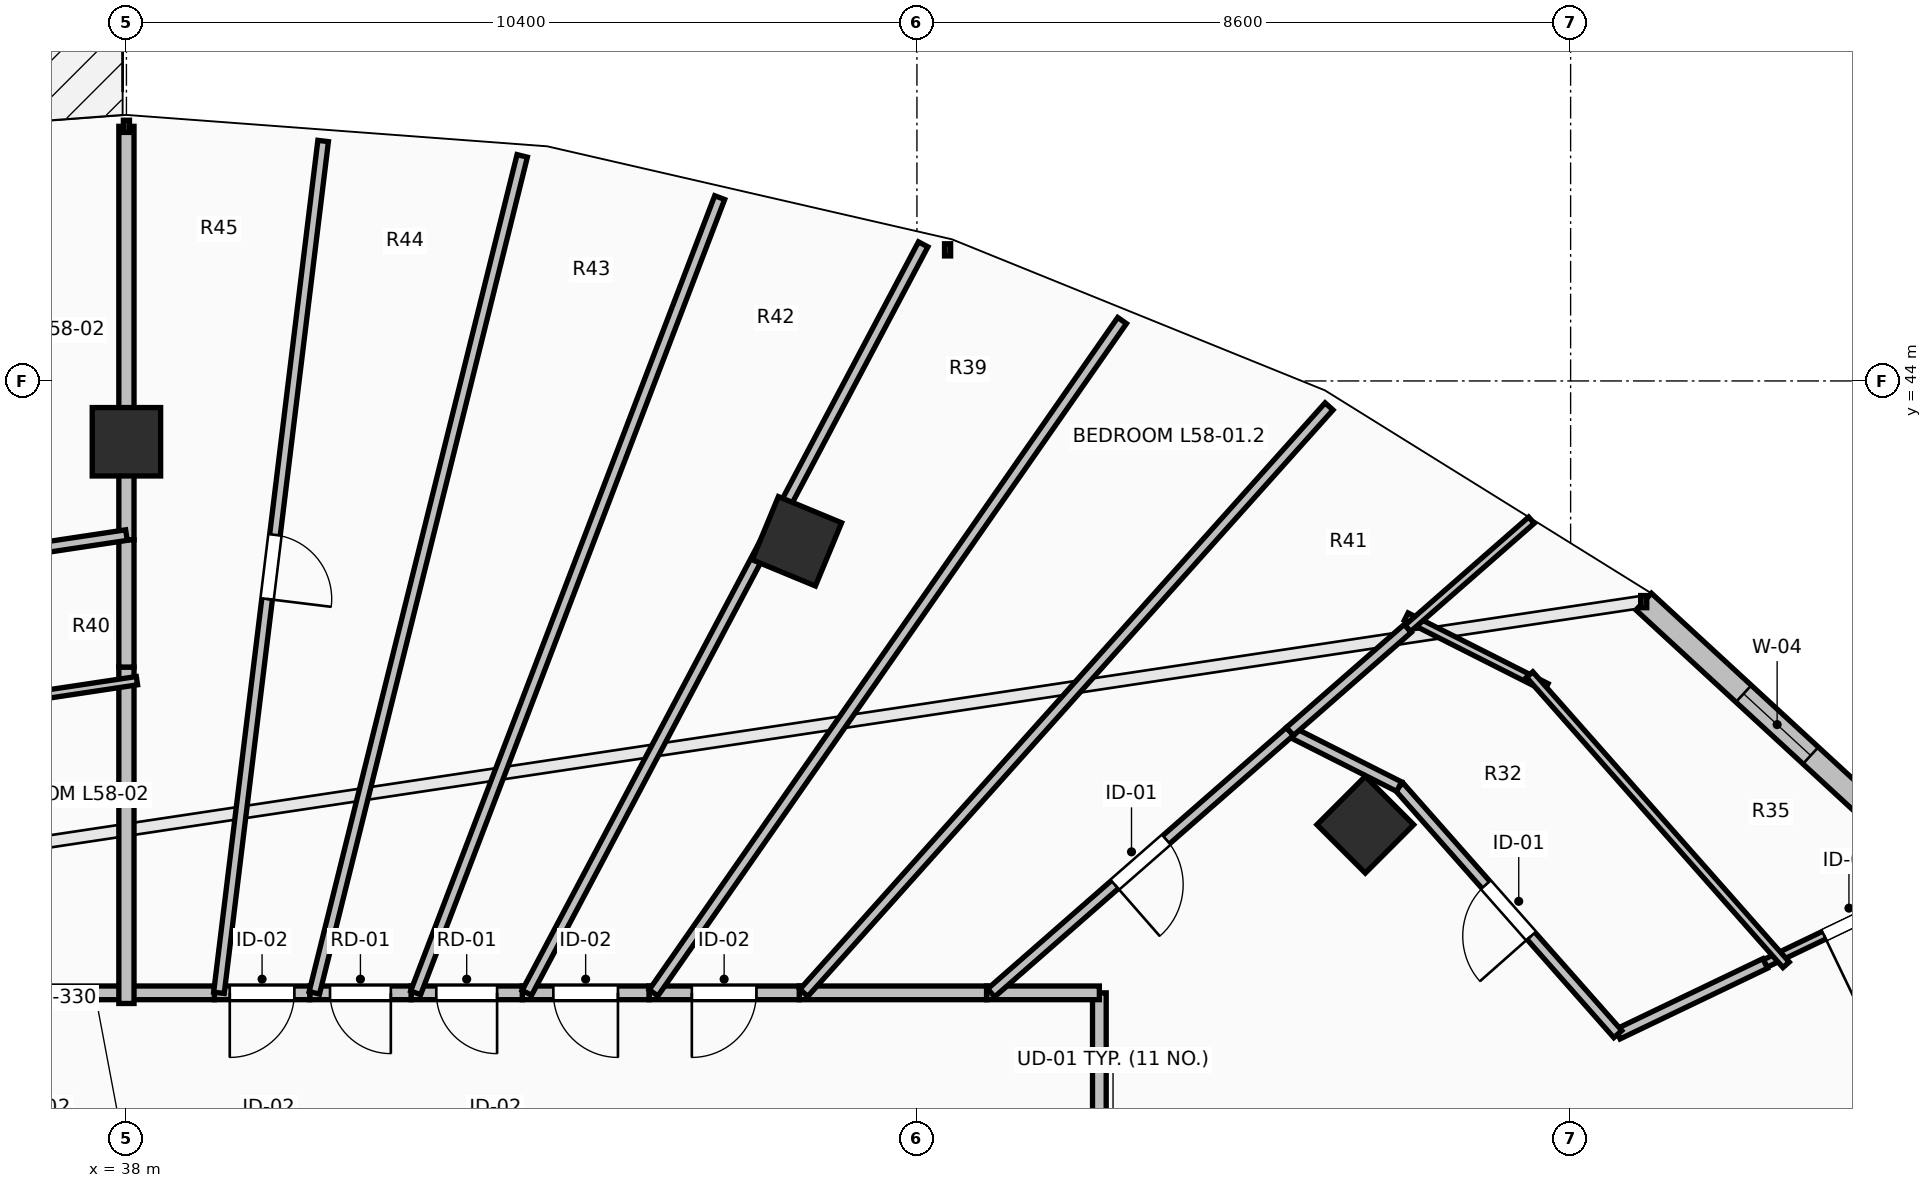
"""IFC4 building model, lengths in metres.
Left out: names, types, materials, properties, quantities, classifications, styles, units other than length and angle.
Written with IfcOpenShell. Run it as: python <this file> out.ifc"""

import sys

from ifc_helpers import new_model, si_unit, direction, frame, frame_2d, origin, origin_2d, place, context, subcontext, project, spatial, rectangle, extrude, element, fill, save


model = new_model("IFC4")
c1 = context("Model", 3, precision=1e-05, world=origin(), true_north=direction((0.0, 1.0)))
c2 = subcontext(c1, "Body", "Model", "MODEL_VIEW")
j1 = project(units=[si_unit("LENGTHUNIT", "METRE"), si_unit("PLANEANGLEUNIT", "RADIAN")], contexts=[c1])
p1 = place(None, origin())
s1 = spatial("IfcSite", under=j1, at=p1, CompositionType="ELEMENT")
p2 = place(p1, origin())
s2 = spatial("IfcBuilding", under=s1, at=p2, CompositionType="ELEMENT")
p3 = place(p2, frame((0.0, 0.0, 214.3)))
s3 = spatial("IfcBuildingStorey", under=s2, at=p3, CompositionType="ELEMENT", Elevation=214.3)
for number, where, z_axis, x_axis in (
    (1, (54.299, 38.162, 0.0), (0.0, 0.0, 1.0), (0.707, 0.707, 0.0)),
    (2, (46.821, 41.891, 0.0), (0.0, 0.0, 1.0), (0.383, 0.924, 0.0)),
    (3, (38.0, 43.2, 0.0), (0.0, 0.0, 1.0), (0.0, 1.0, 0.0)),
):
    element("IfcColumn", number, at=place(p3, frame(where, z_axis=z_axis, x_axis=x_axis)), inside=s3, PredefinedType="COLUMN", context=c2, shape_type="SweptSolid", body=[
        extrude(rectangle(XDim=0.9, YDim=0.9, at=origin_2d()), origin(), (0.0, 0.0, 1.0), 3.55),
    ])
p4 = place(p3, frame((61.472, 37.861, 0.0), z_axis=(0.0, 0.0, 1.0), x_axis=(-0.735359993374, 0.677676678177, 0.0)))
e4 = element("IfcWall", 4, at=p4, inside=s3, PredefinedType="STANDARD", context=c2, shape_type="SweptSolid", body=[
    extrude(rectangle(XDim=4.774, YDim=0.3, at=frame_2d((2.387, 0.0))), origin(), (0.0, 0.0, 1.0), 3.29),
])
p5 = place(p4, frame((1.787, 0.0, 0.85)))
e5 = element("IfcOpeningElement", 5, at=p5, cuts=e4, PredefinedType="OPENING", context=c2, shape_type="SweptSolid", body=[
    extrude(rectangle(XDim=1.2, YDim=2.1, at=frame_2d((0.6, 1.05))), frame((0.0, 0.165, 0.0), z_axis=(0.0, -1.0, 0.0), x_axis=(1.0, 0.0, 0.0)), (0.0, 0.0, 1.0), 0.33),
])
p6 = place(p3, frame((50.8, 31.751, 0.0), z_axis=(0.0, 0.0, 1.0), x_axis=(0.0, 1.0, 0.0)))
e6 = element("IfcWall", 6, at=p6, inside=s3, PredefinedType="PARTITIONING", context=c2, shape_type="SweptSolid", body=[
    extrude(rectangle(XDim=4.199, YDim=0.18, at=frame_2d((2.1, 0.0))), origin(), (0.0, 0.0, 1.0), 2.482),
])
p7 = place(p6, frame((1.6, 0.0, 0.0)))
e7 = element("IfcOpeningElement", 7, at=p7, cuts=e6, PredefinedType="OPENING", context=c2, shape_type="SweptSolid", body=[
    extrude(rectangle(XDim=1.0, YDim=2.15, at=frame_2d((0.5, 1.075))), frame((0.0, 0.105, 0.0), z_axis=(0.0, -1.0, 0.0), x_axis=(1.0, 0.0, 0.0)), (0.0, 0.0, 1.0), 0.21),
])
p8 = place(p3, frame((50.8, 35.95, 0.0), z_axis=(0.0, 0.0, 1.0), x_axis=(-1.0, 0.0, 0.0)))
e8 = element("IfcWall", 8, at=p8, inside=s3, PredefinedType="PARTITIONING", context=c2, shape_type="SweptSolid", body=[
    extrude(rectangle(XDim=1.484, YDim=0.18, at=frame_2d((0.742, 0.0))), origin(), (0.0, 0.0, 1.0), 3.29),
])
p9 = place(p3, frame((49.316, 35.95, 0.0), z_axis=(0.0, 0.0, 1.0), x_axis=(-1.0, 0.0, 0.0)))
e9 = element("IfcWall", 9, at=p9, inside=s3, PredefinedType="PARTITIONING", context=c2, shape_type="SweptSolid", body=[
    extrude(rectangle(XDim=2.464, YDim=0.18, at=frame_2d((1.232, 0.0))), origin(), (0.0, 0.0, 1.0), 2.482),
])
p10 = place(p3, frame((46.852, 35.95, 0.0), z_axis=(0.0, 0.0, 1.0), x_axis=(-1.0, 0.0, 0.0)))
e10 = element("IfcWall", 10, at=p10, inside=s3, PredefinedType="PARTITIONING", context=c2, shape_type="SweptSolid", body=[
    extrude(rectangle(XDim=1.977, YDim=0.18, at=frame_2d((0.989, 0.0))), origin(), (0.0, 0.0, 1.0), 2.979),
])
p11 = place(p10, frame((0.563, 0.0, 0.0)))
e11 = element("IfcOpeningElement", 11, at=p11, cuts=e10, PredefinedType="OPENING", context=c2, shape_type="SweptSolid", body=[
    extrude(rectangle(XDim=0.85, YDim=2.1, at=frame_2d((0.425, 1.05))), frame((0.0, 0.105, 0.0), z_axis=(0.0, -1.0, 0.0), x_axis=(1.0, 0.0, 0.0)), (0.0, 0.0, 1.0), 0.21),
])
p12 = place(p3, frame((44.875, 35.95, 0.0), z_axis=(0.0, 0.0, 1.0), x_axis=(-1.0, 0.0, 0.0)))
e12 = element("IfcWall", 12, at=p12, inside=s3, PredefinedType="PARTITIONING", context=c2, shape_type="SweptSolid", body=[
    extrude(rectangle(XDim=1.667, YDim=0.18, at=frame_2d((0.833, 0.0))), origin(), (0.0, 0.0, 1.0), 2.979),
])
p13 = place(p12, frame((0.408, 0.0, 0.0)))
e13 = element("IfcOpeningElement", 13, at=p13, cuts=e12, PredefinedType="OPENING", context=c2, shape_type="SweptSolid", body=[
    extrude(rectangle(XDim=0.85, YDim=2.1, at=frame_2d((0.425, 1.05))), frame((0.0, 0.105, 0.0), z_axis=(0.0, -1.0, 0.0), x_axis=(1.0, 0.0, 0.0)), (0.0, 0.0, 1.0), 0.21),
])
p14 = place(p3, frame((43.208, 35.95, 0.0), z_axis=(0.0, 0.0, 1.0), x_axis=(-1.0, 0.0, 0.0)))
e14 = element("IfcWall", 14, at=p14, inside=s3, PredefinedType="PARTITIONING", context=c2, shape_type="SweptSolid", body=[
    extrude(rectangle(XDim=1.463, YDim=0.18, at=frame_2d((0.731, 0.0))), origin(), (0.0, 0.0, 1.0), 2.979),
])
p15 = place(p14, frame((0.332, 0.0, 0.0)))
e15 = element("IfcOpeningElement", 15, at=p15, cuts=e14, PredefinedType="OPENING", context=c2, shape_type="SweptSolid", body=[
    extrude(rectangle(XDim=0.8, YDim=2.05, at=frame_2d((0.4, 1.025))), frame((0.0, 0.105, 0.0), z_axis=(0.0, -1.0, 0.0), x_axis=(1.0, 0.0, 0.0)), (0.0, 0.0, 1.0), 0.21),
])
p16 = place(p3, frame((41.745, 35.95, 0.0), z_axis=(0.0, 0.0, 1.0), x_axis=(-1.0, 0.0, 0.0)))
e16 = element("IfcWall", 16, at=p16, inside=s3, PredefinedType="PARTITIONING", context=c2, shape_type="SweptSolid", body=[
    extrude(rectangle(XDim=1.333, YDim=0.18, at=frame_2d((0.667, 0.0))), origin(), (0.0, 0.0, 1.0), 2.979),
])
p17 = place(p16, frame((0.267, 0.0, 0.0)))
e17 = element("IfcOpeningElement", 17, at=p17, cuts=e16, PredefinedType="OPENING", context=c2, shape_type="SweptSolid", body=[
    extrude(rectangle(XDim=0.8, YDim=2.05, at=frame_2d((0.4, 1.025))), frame((0.0, 0.105, 0.0), z_axis=(0.0, -1.0, 0.0), x_axis=(1.0, 0.0, 0.0)), (0.0, 0.0, 1.0), 0.21),
])
p18 = place(p3, frame((40.412, 35.95, 0.0), z_axis=(0.0, 0.0, 1.0), x_axis=(-1.0, 0.0, 0.0)))
e18 = element("IfcWall", 18, at=p18, inside=s3, PredefinedType="PARTITIONING", context=c2, shape_type="SweptSolid", body=[
    extrude(rectangle(XDim=1.255, YDim=0.18, at=frame_2d((0.627, 0.0))), origin(), (0.0, 0.0, 1.0), 2.979),
])
p19 = place(p18, frame((0.202, 0.0, 0.0)))
e19 = element("IfcOpeningElement", 19, at=p19, cuts=e18, PredefinedType="OPENING", context=c2, shape_type="SweptSolid", body=[
    extrude(rectangle(XDim=0.85, YDim=2.1, at=frame_2d((0.425, 1.05))), frame((0.0, 0.105, 0.0), z_axis=(0.0, -1.0, 0.0), x_axis=(1.0, 0.0, 0.0)), (0.0, 0.0, 1.0), 0.21),
])
p20 = place(p3, frame((39.157, 35.95, 0.0), z_axis=(0.0, 0.0, 1.0), x_axis=(-1.0, 0.0, 0.0)))
e20 = element("IfcWall", 20, at=p20, inside=s3, PredefinedType="PARTITIONING", context=c2, shape_type="SweptSolid", body=[
    extrude(rectangle(XDim=1.217, YDim=0.18, at=frame_2d((0.608, 0.0))), origin(), (0.0, 0.0, 1.0), 2.979),
])
p21 = place(p3, frame((38.08, 35.95, 0.0), z_axis=(0.0, 0.0, 1.0), x_axis=(-1.0, 0.0, 0.0)))
e21 = element("IfcWall", 21, at=p21, inside=s3, PredefinedType="PARTITIONING", context=c2, shape_type="SweptSolid", body=[
    extrude(rectangle(XDim=2.488, YDim=0.18, at=frame_2d((1.244, 0.0))), origin(), (0.0, 0.0, 1.0), 2.979),
])
p22 = place(p3, frame((61.919, 37.468, 0.0), z_axis=(0.0, 0.0, 1.0), x_axis=(-0.901731167672, -0.432297237151, 0.0)))
e22 = element("IfcWall", 22, at=p22, inside=s3, PredefinedType="PARTITIONING", context=c2, shape_type="SweptSolid", body=[
    extrude(rectangle(XDim=2.616, YDim=0.11, at=frame_2d((1.308, 0.0))), origin(), (0.0, 0.0, 1.0), 3.29),
])
p23 = place(p22, frame((0.858, 0.0, 0.0)))
e23 = element("IfcOpeningElement", 23, at=p23, cuts=e22, PredefinedType="OPENING", context=c2, shape_type="SweptSolid", body=[
    extrude(rectangle(XDim=0.9, YDim=2.1, at=frame_2d((0.45, 1.05))), frame((0.0, 0.07, 0.0), z_axis=(0.0, -1.0, 0.0), x_axis=(1.0, 0.0, 0.0)), (0.0, 0.0, 1.0), 0.14),
])
p24 = place(p3, frame((59.56, 36.336, 0.0), z_axis=(0.0, 0.0, 1.0), x_axis=(-0.901730274491, -0.432299100238, 0.0)))
e24 = element("IfcWall", 24, at=p24, inside=s3, PredefinedType="PARTITIONING", context=c2, shape_type="SweptSolid", body=[
    extrude(rectangle(XDim=2.15, YDim=0.14, at=frame_2d((1.075, 0.0))), origin(), (0.0, 0.0, 1.0), 3.29),
])
p25 = place(p3, frame((57.621, 35.407, 0.0), z_axis=(0.0, 0.0, 1.0), x_axis=(-0.662160377652, 0.749362151612, 0.0)))
e25 = element("IfcWall", 25, at=p25, inside=s3, PredefinedType="PARTITIONING", context=c2, shape_type="SweptSolid", body=[
    extrude(rectangle(XDim=4.345, YDim=0.14, at=frame_2d((2.173, 0.0))), origin(), (0.0, 0.0, 1.0), 3.29),
])
p26 = place(p25, frame((1.722, 0.0, 0.0)))
e26 = element("IfcOpeningElement", 26, at=p26, cuts=e25, PredefinedType="OPENING", context=c2, shape_type="SweptSolid", body=[
    extrude(rectangle(XDim=0.9, YDim=2.1, at=frame_2d((0.45, 1.05))), frame((0.0, 0.085, 0.0), z_axis=(0.0, -1.0, 0.0), x_axis=(1.0, 0.0, 0.0)), (0.0, 0.0, 1.0), 0.17),
])
p27 = place(p3, frame((54.744, 38.663, 0.0), z_axis=(0.0, 0.0, 1.0), x_axis=(-0.892600010283, 0.450849444541, 0.0)))
e27 = element("IfcWall", 27, at=p27, inside=s3, PredefinedType="PARTITIONING", context=c2, shape_type="SweptSolid", body=[
    extrude(rectangle(XDim=1.61, YDim=0.14, at=frame_2d((0.805, 0.0))), origin(), (0.0, 0.0, 1.0), 3.29),
])
p28 = place(p3, frame((53.307, 39.389, 0.0), z_axis=(0.0, 0.0, 1.0), x_axis=(-0.752631709834, -0.658441728137, 0.0)))
e28 = element("IfcWall", 28, at=p28, inside=s3, PredefinedType="PARTITIONING", context=c2, shape_type="SweptSolid", body=[
    extrude(rectangle(XDim=5.223, YDim=0.14, at=frame_2d((2.611, 0.0))), origin(), (0.0, 0.0, 1.0), 2.824),
])
p29 = place(p28, frame((2.162, 0.0, 0.0)))
e29 = element("IfcOpeningElement", 29, at=p29, cuts=e28, PredefinedType="OPENING", context=c2, shape_type="SweptSolid", body=[
    extrude(rectangle(XDim=0.9, YDim=2.1, at=frame_2d((0.45, 1.05))), frame((0.0, 0.085, 0.0), z_axis=(0.0, -1.0, 0.0), x_axis=(1.0, 0.0, 0.0)), (0.0, 0.0, 1.0), 0.17),
])
p30 = place(p3, frame((54.837, 40.899, 0.0), z_axis=(0.0, 0.0, 1.0), x_axis=(0.892645505641, -0.450759360701, 0.0)))
e30 = element("IfcWall", 30, at=p30, inside=s3, PredefinedType="PARTITIONING", context=c2, shape_type="SweptSolid", body=[
    extrude(rectangle(XDim=2.063, YDim=0.11, at=frame_2d((1.032, 0.0))), origin(), (0.0, 0.0, 1.0), 3.29),
])
p31 = place(p3, frame((56.461, 40.137, 0.0), z_axis=(0.0, 0.0, 1.0), x_axis=(0.662153993881, -0.749367792467, 0.0)))
e31 = element("IfcWall", 31, at=p31, inside=s3, PredefinedType="PARTITIONING", context=c2, shape_type="SweptSolid", body=[
    extrude(rectangle(XDim=5.095, YDim=0.11, at=frame_2d((2.547, 0.0))), origin(), (0.0, 0.0, 1.0), 3.29),
])
p32 = place(p3, frame((56.484, 42.168, 0.0), z_axis=(0.0, 0.0, 1.0), x_axis=(-0.752555717051, -0.658528581562, 0.0)))
e32 = element("IfcWall", 32, at=p32, inside=s3, PredefinedType="PARTITIONING", context=c2, shape_type="SweptSolid", body=[
    extrude(rectangle(XDim=2.163, YDim=0.11, at=frame_2d((1.082, 0.0))), origin(), (0.0, 0.0, 1.0), 3.29),
])
p33 = place(p3, frame((54.856, 40.744, 0.0), z_axis=(0.0, 0.0, 1.0), x_axis=(-0.752679548168, -0.658387042528, 0.0)))
e33 = element("IfcWall", 33, at=p33, inside=s3, PredefinedType="PARTITIONING", context=c2, shape_type="SweptSolid", body=[
    extrude(rectangle(XDim=2.058, YDim=0.14, at=frame_2d((1.029, 0.0))), origin(), (0.0, 0.0, 1.0), 3.29),
])
p34 = place(p3, frame((53.822, 43.665, 0.0), z_axis=(0.0, 0.0, 1.0), x_axis=(-0.667166856079, -0.74490830721, 0.0)))
e34 = element("IfcWall", 34, at=p34, inside=s3, PredefinedType="PARTITIONING", context=c2, shape_type="SweptSolid", body=[
    extrude(rectangle(XDim=10.357, YDim=0.14, at=frame_2d((5.179, 0.0))), origin(), (0.0, 0.0, 1.0), 2.482),
])
p35 = place(p3, frame((51.099, 44.795, 0.0), z_axis=(0.0, 0.0, 1.0), x_axis=(-0.571754326018, -0.82042488424, 0.0)))
e35 = element("IfcWall", 35, at=p35, inside=s3, PredefinedType="PARTITIONING", context=c2, shape_type="SweptSolid", body=[
    extrude(rectangle(XDim=10.781, YDim=0.14, at=frame_2d((5.391, 0.0))), origin(), (0.0, 0.0, 1.0), 2.482),
])
p36 = place(p3, frame((48.482, 45.797, 0.0), z_axis=(0.0, 0.0, 1.0), x_axis=(-0.46793402924, -0.883763398359, 0.0)))
e36 = element("IfcWall", 36, at=p36, inside=s3, PredefinedType="PARTITIONING", context=c2, shape_type="SweptSolid", body=[
    extrude(rectangle(XDim=11.142, YDim=0.14, at=frame_2d((5.571, 0.0))), origin(), (0.0, 0.0, 1.0), 2.824),
])
p37 = place(p3, frame((45.805, 46.412, 0.0), z_axis=(0.0, 0.0, 1.0), x_axis=(-0.357119008819, -0.934058891901, 0.0)))
e37 = element("IfcWall", 37, at=p37, inside=s3, PredefinedType="PARTITIONING", context=c2, shape_type="SweptSolid", body=[
    extrude(rectangle(XDim=11.201, YDim=0.14, at=frame_2d((5.6, 0.0))), origin(), (0.0, 0.0, 1.0), 2.824),
])
p38 = place(p3, frame((43.207, 46.961, 0.0), z_axis=(0.0, 0.0, 1.0), x_axis=(-0.241072089133, -0.970507211638, 0.0)))
e38 = element("IfcWall", 38, at=p38, inside=s3, PredefinedType="PARTITIONING", context=c2, shape_type="SweptSolid", body=[
    extrude(rectangle(XDim=11.346, YDim=0.14, at=frame_2d((5.673, 0.0))), origin(), (0.0, 0.0, 1.0), 2.824),
])
p39 = place(p3, frame((40.588, 47.157, 0.0), z_axis=(0.0, 0.0, 1.0), x_axis=(-0.121415539359, -0.992601766471, 0.0)))
e39 = element("IfcWall", 39, at=p39, inside=s3, PredefinedType="PARTITIONING", context=c2, shape_type="SweptSolid", body=[
    extrude(rectangle(XDim=11.291, YDim=0.14, at=frame_2d((5.645, 0.0))), origin(), (0.0, 0.0, 1.0), 2.824),
])
p40 = place(p39, frame((5.22, 0.0, 0.0)))
e40 = element("IfcOpeningElement", 40, at=p40, cuts=e39, PredefinedType="OPENING", context=c2, shape_type="SweptSolid", body=[
    extrude(rectangle(XDim=0.85, YDim=2.1, at=frame_2d((0.425, 1.05))), frame((0.0, 0.085, 0.0), z_axis=(0.0, -1.0, 0.0), x_axis=(1.0, 0.0, 0.0)), (0.0, 0.0, 1.0), 0.17),
])
p41 = place(p3, frame((38.0, 47.35, 0.0), z_axis=(0.0, 0.0, 1.0), x_axis=(0.0, -1.0, 0.0)))
e41 = element("IfcWall", 41, at=p41, inside=s3, PredefinedType="PARTITIONING", context=c2, shape_type="SweptSolid", body=[
    extrude(rectangle(XDim=5.439, YDim=0.2, at=frame_2d((2.72, 0.0))), origin(), (0.0, 0.0, 1.0), 3.29),
])
p42 = place(p3, frame((38.0, 40.236, 0.0), z_axis=(0.0, 0.0, 1.0), x_axis=(0.0, -1.0, 0.0)))
e42 = element("IfcWall", 42, at=p42, inside=s3, PredefinedType="PARTITIONING", context=c2, shape_type="SweptSolid", body=[
    extrude(rectangle(XDim=4.426, YDim=0.2, at=frame_2d((2.213, 0.0))), origin(), (0.0, 0.0, 1.0), 2.936),
])
p43 = place(p3, frame((38.0, 41.911, 0.0), z_axis=(0.0, 0.0, 1.0), x_axis=(0.0, -1.0, 0.0)))
e43 = element("IfcWall", 43, at=p43, inside=s3, PredefinedType="PARTITIONING", context=c2, shape_type="SweptSolid", body=[
    extrude(rectangle(XDim=1.675, YDim=0.2, at=frame_2d((0.837, 0.0))), origin(), (0.0, 0.0, 1.0), 3.29),
])
p44 = place(p3, frame((34.391, 41.429, 0.0), z_axis=(0.0, 0.0, 1.0), x_axis=(0.988870503719, 0.148778785027, 0.0)))
e44 = element("IfcWall", 44, at=p44, inside=s3, PredefinedType="PARTITIONING", context=c2, shape_type="SweptSolid", body=[
    extrude(rectangle(XDim=3.649, YDim=0.14, at=frame_2d((1.825, 0.0))), origin(), (0.0, 0.0, 1.0), 2.482),
])
p45 = place(p44, frame((1.375, 0.0, 0.0)))
e45 = element("IfcOpeningElement", 45, at=p45, cuts=e44, PredefinedType="OPENING", context=c2, shape_type="SweptSolid", body=[
    extrude(rectangle(XDim=0.9, YDim=2.1, at=frame_2d((0.45, 1.05))), frame((0.0, 0.085, 0.0), z_axis=(0.0, -1.0, 0.0), x_axis=(1.0, 0.0, 0.0)), (0.0, 0.0, 1.0), 0.17),
])
p46 = place(p3, frame((38.138, 40.057, 0.0), z_axis=(0.0, 0.0, 1.0), x_axis=(-0.988873620703, -0.14875806626, 0.0)))
e46 = element("IfcWall", 46, at=p46, inside=s3, PredefinedType="PARTITIONING", context=c2, shape_type="SweptSolid", body=[
    extrude(rectangle(XDim=3.488, YDim=0.11, at=frame_2d((1.744, 0.0))), origin(), (0.0, 0.0, 1.0), 2.936),
])
p47 = place(p5, origin())
e47 = element("IfcWindow", 47, at=p47, inside=s3, PartitioningType="SINGLE_PANEL", PredefinedType="WINDOW", context=c2, shape_type="SweptSolid", body=[
    extrude(rectangle(XDim=1.2, YDim=2.1, at=frame_2d((0.6, 1.05))), frame((0.0, 0.03, 0.0), z_axis=(0.0, -1.0, 0.0), x_axis=(1.0, 0.0, 0.0)), (0.0, 0.0, 1.0), 0.06),
])
fill(e5, e47)
p48 = place(p23, origin())
e48 = element("IfcDoor", 48, at=p48, inside=s3, OperationType="SINGLE_SWING_RIGHT", PredefinedType="DOOR", context=c2, shape_type="SweptSolid", body=[
    extrude(rectangle(XDim=0.9, YDim=2.1, at=frame_2d((0.45, 1.05))), frame((0.0, 0.025, 0.0), z_axis=(0.0, -1.0, 0.0), x_axis=(1.0, 0.0, 0.0)), (0.0, 0.0, 1.0), 0.05),
])
fill(e23, e48)
p49 = place(p26, origin())
e49 = element("IfcDoor", 49, at=p49, inside=s3, OperationType="SINGLE_SWING_LEFT", PredefinedType="DOOR", context=c2, shape_type="SweptSolid", body=[
    extrude(rectangle(XDim=0.9, YDim=2.1, at=frame_2d((0.45, 1.05))), frame((0.0, 0.025, 0.0), z_axis=(0.0, -1.0, 0.0), x_axis=(1.0, 0.0, 0.0)), (0.0, 0.0, 1.0), 0.05),
])
fill(e26, e49)
p50 = place(p29, origin())
e50 = element("IfcDoor", 50, at=p50, inside=s3, OperationType="SINGLE_SWING_RIGHT", PredefinedType="DOOR", context=c2, shape_type="SweptSolid", body=[
    extrude(rectangle(XDim=0.9, YDim=2.1, at=frame_2d((0.45, 1.05))), frame((0.0, 0.025, 0.0), z_axis=(0.0, -1.0, 0.0), x_axis=(1.0, 0.0, 0.0)), (0.0, 0.0, 1.0), 0.05),
])
fill(e29, e50)
p51 = place(p11, origin())
e51 = element("IfcDoor", 51, at=p51, inside=s3, OperationType="SINGLE_SWING_RIGHT", PredefinedType="DOOR", context=c2, shape_type="SweptSolid", body=[
    extrude(rectangle(XDim=0.85, YDim=2.1, at=frame_2d((0.425, 1.05))), frame((0.0, 0.025, 0.0), z_axis=(0.0, -1.0, 0.0), x_axis=(1.0, 0.0, 0.0)), (0.0, 0.0, 1.0), 0.05),
])
fill(e11, e51)
p52 = place(p13, origin())
e52 = element("IfcDoor", 52, at=p52, inside=s3, OperationType="SINGLE_SWING_LEFT", PredefinedType="DOOR", context=c2, shape_type="SweptSolid", body=[
    extrude(rectangle(XDim=0.85, YDim=2.1, at=frame_2d((0.425, 1.05))), frame((0.0, 0.025, 0.0), z_axis=(0.0, -1.0, 0.0), x_axis=(1.0, 0.0, 0.0)), (0.0, 0.0, 1.0), 0.05),
])
fill(e13, e52)
p53 = place(p15, origin())
e53 = element("IfcDoor", 53, at=p53, inside=s3, OperationType="SINGLE_SWING_LEFT", PredefinedType="DOOR", context=c2, shape_type="SweptSolid", body=[
    extrude(rectangle(XDim=0.8, YDim=2.05, at=frame_2d((0.4, 1.025))), frame((0.0, 0.025, 0.0), z_axis=(0.0, -1.0, 0.0), x_axis=(1.0, 0.0, 0.0)), (0.0, 0.0, 1.0), 0.05),
])
fill(e15, e53)
p54 = place(p17, origin())
e54 = element("IfcDoor", 54, at=p54, inside=s3, OperationType="SINGLE_SWING_LEFT", PredefinedType="DOOR", context=c2, shape_type="SweptSolid", body=[
    extrude(rectangle(XDim=0.8, YDim=2.05, at=frame_2d((0.4, 1.025))), frame((0.0, 0.025, 0.0), z_axis=(0.0, -1.0, 0.0), x_axis=(1.0, 0.0, 0.0)), (0.0, 0.0, 1.0), 0.05),
])
fill(e17, e54)
p55 = place(p19, origin())
e55 = element("IfcDoor", 55, at=p55, inside=s3, OperationType="SINGLE_SWING_RIGHT", PredefinedType="DOOR", context=c2, shape_type="SweptSolid", body=[
    extrude(rectangle(XDim=0.85, YDim=2.1, at=frame_2d((0.425, 1.05))), frame((0.0, 0.025, 0.0), z_axis=(0.0, -1.0, 0.0), x_axis=(1.0, 0.0, 0.0)), (0.0, 0.0, 1.0), 0.05),
])
fill(e19, e55)
p56 = place(p40, origin())
e56 = element("IfcDoor", 56, at=p56, inside=s3, OperationType="SINGLE_SWING_RIGHT", PredefinedType="DOOR", context=c2, shape_type="SweptSolid", body=[
    extrude(rectangle(XDim=0.85, YDim=2.1, at=frame_2d((0.425, 1.05))), frame((0.0, 0.025, 0.0), z_axis=(0.0, -1.0, 0.0), x_axis=(1.0, 0.0, 0.0)), (0.0, 0.0, 1.0), 0.05),
])
fill(e40, e56)
save(model, sys.argv[1])
